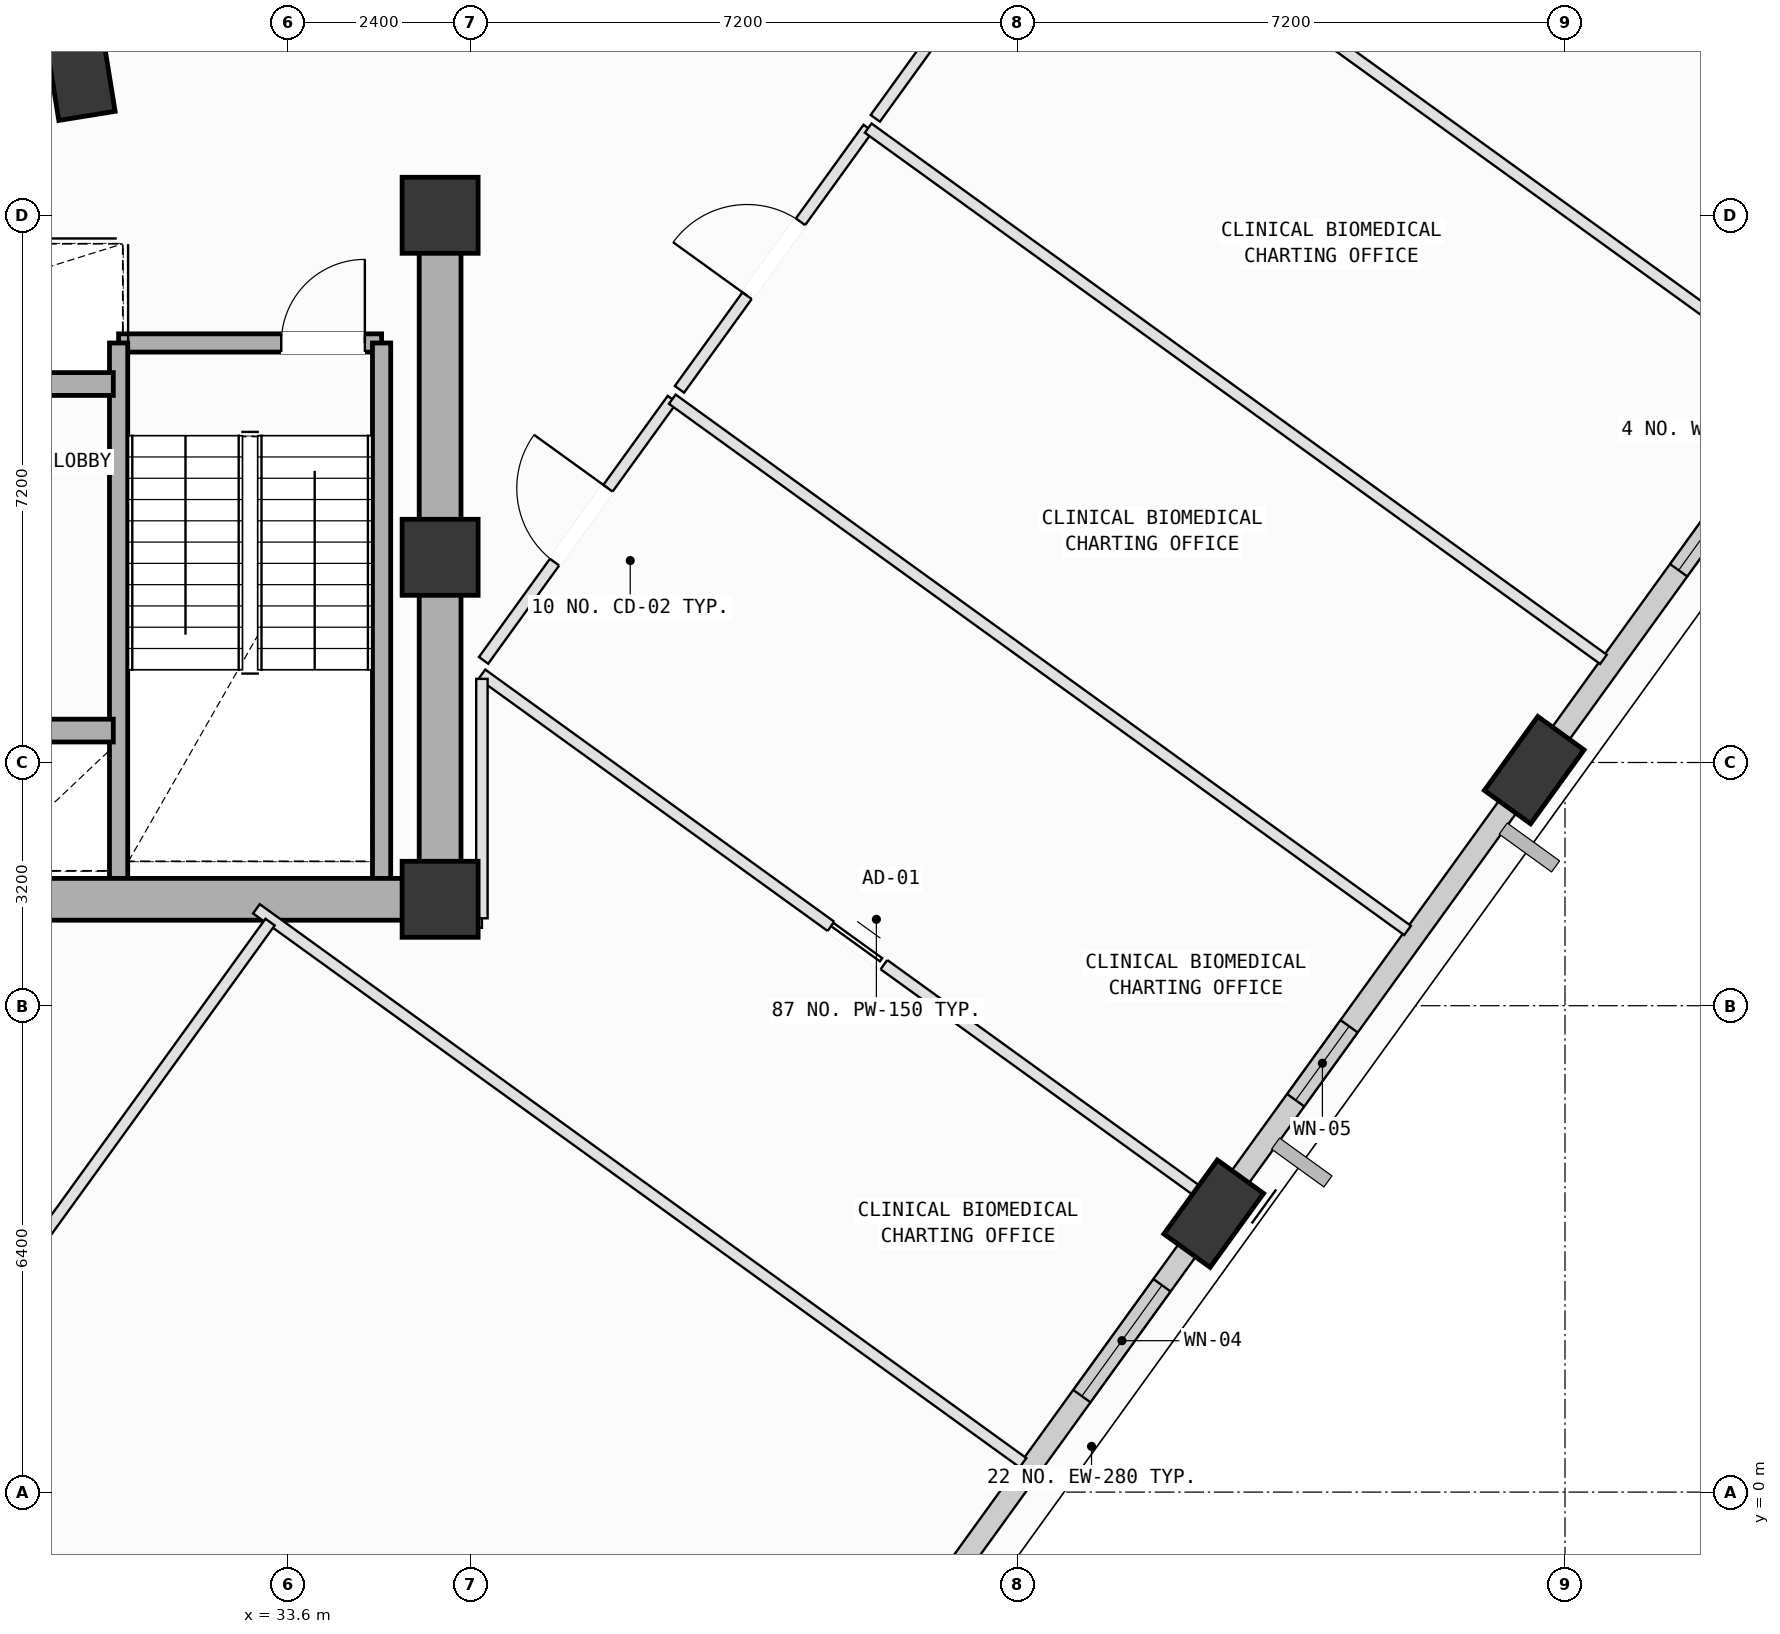
"""IFC4 building model, lengths in metres.
Left out: names, types, materials, properties, quantities, classifications, styles, units other than length and angle.
Written with IfcOpenShell. Run it as: python <this file> out.ifc"""

import sys

from ifc_helpers import new_model, si_unit, direction, frame, frame_2d, origin, origin_2d, place, context, subcontext, project, spatial, rectangle, extrude, element, fill, save


model = new_model("IFC4")
c1 = context("Model", 3, precision=1e-05, world=origin(), true_north=direction((0.0, 1.0)))
c2 = subcontext(c1, "Body", "Model", "MODEL_VIEW")
j1 = project(units=[si_unit("LENGTHUNIT", "METRE"), si_unit("PLANEANGLEUNIT", "RADIAN")], contexts=[c1])
p1 = place(None, origin())
s1 = spatial("IfcSite", under=j1, at=p1, CompositionType="ELEMENT")
p2 = place(p1, origin())
s2 = spatial("IfcBuilding", under=s1, at=p2, CompositionType="ELEMENT")
p3 = place(p2, frame((0.0, 0.0, 255.2)))
s3 = spatial("IfcBuildingStorey", under=s2, at=p3, CompositionType="ELEMENT", Elevation=255.2)
for number, where, z_axis, x_axis in (
    (1, (35.6, 7.8, 0.0), (0.0, 0.0, 1.0), (1.0, 0.0, 0.0)),
    (2, (35.6, 12.3, 0.0), (0.0, 0.0, 1.0), (1.0, 0.0, 0.0)),
    (3, (35.6, 16.8, 0.0), (0.0, 0.0, 1.0), (1.0, 0.0, 0.0)),
):
    element("IfcColumn", number, at=place(p3, frame(where, z_axis=z_axis, x_axis=x_axis)), inside=s3, PredefinedType="COLUMN", context=c2, shape_type="SweptSolid", body=[
        extrude(rectangle(XDim=1.0, YDim=1.0, at=origin_2d()), origin(), (0.0, 0.0, 1.0), 4.0),
    ])
p4 = place(p3, frame((45.778, 3.664, 0.002), z_axis=(0.086734862817, 0.050934698697, 0.994928499964), x_axis=(-0.991973488949, 0.09665186212, 0.081529226481)))
e4 = element("IfcColumn", 4, at=p4, inside=s3, PredefinedType="COLUMN", context=c2, shape_type="SweptSolid", body=[
    extrude(rectangle(XDim=1.2, YDim=0.75, at=origin_2d()), origin(), (0.0, 0.0, 1.0), 4.017),
])
p5 = place(p3, frame((49.995, 9.5, 0.002), z_axis=(0.062592857053, 0.068189108606, 0.995706974824), x_axis=(-0.977221341298, -0.198518401918, 0.075025956915)))
e5 = element("IfcColumn", 5, at=p5, inside=s3, PredefinedType="COLUMN", context=c2, shape_type="SweptSolid", body=[
    extrude(rectangle(XDim=1.2, YDim=0.75, at=origin_2d()), origin(), (0.0, 0.0, 1.0), 4.014),
])
p6 = place(p3, frame((30.858, 18.7, 0.002), z_axis=(0.025404102612, -0.011175362447, 0.999614797232), x_axis=(-0.967383589686, 0.251829726093, 0.027400355134)))
e6 = element("IfcColumn", 6, at=p6, inside=s3, PredefinedType="COLUMN", context=c2, shape_type="SweptSolid", body=[
    extrude(rectangle(XDim=1.2, YDim=0.75, at=origin_2d()), origin(), (0.0, 0.0, 1.0), 3.998),
])
p7 = place(p3, frame((45.659, 3.498, 0.0), z_axis=(0.0, 0.0, 1.0), x_axis=(-0.585684358283, -0.810539223272, 0.0)))
e7 = element("IfcWall", 7, at=p7, inside=s3, PredefinedType="SOLIDWALL", context=c2, shape_type="SweptSolid", body=[
    extrude(rectangle(XDim=6.439, YDim=0.28, at=frame_2d((3.219, 0.0))), origin(), (0.0, 0.0, 1.0), 3.265),
])
p8 = place(p7, frame((0.958, 0.0, 0.75)))
e8 = element("IfcOpeningElement", 8, at=p8, cuts=e7, PredefinedType="OPENING", context=c2, shape_type="SweptSolid", body=[
    extrude(rectangle(XDim=1.8, YDim=2.05, at=frame_2d((0.9, 1.025))), frame((0.0, 0.15, 0.0), z_axis=(0.0, -1.0, 0.0), x_axis=(1.0, 0.0, 0.0)), (0.0, 0.0, 1.0), 0.3),
])
p9 = place(p3, frame((49.871, 9.327, 0.0), z_axis=(0.0, 0.0, 1.0), x_axis=(-0.585658714941, -0.810557752177, 0.0)))
e9 = element("IfcWall", 9, at=p9, inside=s3, PredefinedType="SOLIDWALL", context=c2, shape_type="SweptSolid", body=[
    extrude(rectangle(XDim=6.414, YDim=0.28, at=frame_2d((3.207, 0.0))), origin(), (0.0, 0.0, 1.0), 3.265),
])
p10 = place(p9, frame((3.946, 0.0, 0.75)))
e10 = element("IfcOpeningElement", 10, at=p10, cuts=e9, PredefinedType="OPENING", context=c2, shape_type="SweptSolid", body=[
    extrude(rectangle(XDim=1.2, YDim=1.75, at=frame_2d((0.6, 0.875))), frame((0.0, 0.15, 0.0), z_axis=(0.0, -1.0, 0.0), x_axis=(1.0, 0.0, 0.0)), (0.0, 0.0, 1.0), 0.3),
])
p11 = place(p3, frame((54.088, 15.164, 0.0), z_axis=(0.0, 0.0, 1.0), x_axis=(-0.585656107045, -0.810559636474, 0.0)))
e11 = element("IfcWall", 11, at=p11, inside=s3, PredefinedType="SOLIDWALL", context=c2, shape_type="SweptSolid", body=[
    extrude(rectangle(XDim=6.407, YDim=0.28, at=frame_2d((3.203, 0.0))), origin(), (0.0, 0.0, 1.0), 3.265),
])
p12 = place(p11, frame((2.143, 0.0, 0.75)))
e12 = element("IfcOpeningElement", 12, at=p12, cuts=e11, PredefinedType="OPENING", context=c2, shape_type="SweptSolid", body=[
    extrude(rectangle(XDim=1.6, YDim=1.95, at=frame_2d((0.8, 0.975))), frame((0.0, 0.15, 0.0), z_axis=(0.0, -1.0, 0.0), x_axis=(1.0, 0.0, 0.0)), (0.0, 0.0, 1.0), 0.3),
])
p13 = place(p3, frame((24.94, 22.976, 0.0), z_axis=(0.0, 0.0, 1.0), x_axis=(0.81054690161, -0.585673731945, 0.0)))
e13 = element("IfcWall", 13, at=p13, inside=s3, PredefinedType="SOLIDWALL", context=c2, shape_type="SweptSolid", body=[
    extrude(rectangle(XDim=6.958, YDim=0.28, at=frame_2d((3.479, 0.0))), origin(), (0.0, 0.0, 1.0), 3.165),
])
p14 = place(p3, frame((31.37, 15.12, 0.0), z_axis=(0.0, 0.0, 1.0), x_axis=(1.0, 0.0, 0.0)))
e14 = element("IfcWall", 14, at=p14, inside=s3, PredefinedType="SOLIDWALL", context=c2, shape_type="SweptSolid", body=[
    extrude(rectangle(XDim=3.46, YDim=0.24, at=frame_2d((1.73, 0.0))), origin(), (0.0, 0.0, 1.0), 3.78),
])
p15 = place(p14, frame((2.14, 0.0, 0.0)))
e15 = element("IfcOpeningElement", 15, at=p15, cuts=e14, PredefinedType="OPENING", context=c2, shape_type="SweptSolid", body=[
    extrude(rectangle(XDim=1.1, YDim=2.15, at=frame_2d((0.55, 1.075))), frame((0.0, 0.13, 0.0), z_axis=(0.0, -1.0, 0.0), x_axis=(1.0, 0.0, 0.0)), (0.0, 0.0, 1.0), 0.26),
])
for number, where, z_axis, x_axis in (
    (16, (34.83, 15.12, 0.0), (0.0, 0.0, 1.0), (0.0, -1.0, 0.0)),
    (17, (31.37, 8.075, 0.0), (0.0, 0.0, 1.0), (0.0, 1.0, 0.0)),
):
    element("IfcWall", number, at=place(p3, frame(where, z_axis=z_axis, x_axis=x_axis)), inside=s3, PredefinedType="SOLIDWALL", context=c2, shape_type="SweptSolid", body=[
        extrude(rectangle(XDim=7.045, YDim=0.24, at=frame_2d((3.522, 0.0))), origin(), (0.0, 0.0, 1.0), 3.78),
    ])
p16 = place(p3, frame((24.8, 7.8, 0.0), z_axis=(0.0, 0.0, 1.0), x_axis=(1.0, 0.0, 0.0)))
e18 = element("IfcWall", 18, at=p16, inside=s3, PredefinedType="SHEAR", context=c2, shape_type="SweptSolid", body=[
    extrude(rectangle(XDim=10.8, YDim=0.55, at=frame_2d((5.4, 0.0))), origin(), (0.0, 0.0, 1.0), 3.78),
])
p17 = place(p3, frame((35.6, 7.8, 0.0), z_axis=(0.0, 0.0, 1.0), x_axis=(0.0, 1.0, 0.0)))
e19 = element("IfcWall", 19, at=p17, inside=s3, PredefinedType="SHEAR", context=c2, shape_type="SweptSolid", body=[
    extrude(rectangle(XDim=9.0, YDim=0.55, at=frame_2d((4.5, 0.0))), origin(), (0.0, 0.0, 1.0), 3.78),
])
p18 = place(p3, frame((29.6, 10.02, 0.0), z_axis=(0.0, 0.0, 1.0), x_axis=(1.0, 0.0, 0.0)))
e20 = element("IfcWall", 20, at=p18, inside=s3, PredefinedType="SOLIDWALL", context=c2, shape_type="SweptSolid", body=[
    extrude(rectangle(XDim=1.7, YDim=0.3, at=frame_2d((0.85, 0.0))), origin(), (0.0, 0.0, 1.0), 3.78),
])
p19 = place(p3, frame((25.85, 14.58, 0.0), z_axis=(0.0, 0.0, 1.0), x_axis=(1.0, 0.0, 0.0)))
e21 = element("IfcWall", 21, at=p19, inside=s3, PredefinedType="SOLIDWALL", context=c2, shape_type="SweptSolid", body=[
    extrude(rectangle(XDim=5.45, YDim=0.3, at=frame_2d((2.725, 0.0))), origin(), (0.0, 0.0, 1.0), 3.78),
])
p20 = place(p19, frame((0.34, 0.0, 0.0)))
e22 = element("IfcOpeningElement", 22, at=p20, cuts=e21, PredefinedType="OPENING", context=c2, shape_type="SweptSolid", body=[
    extrude(rectangle(XDim=1.12, YDim=2.15, at=frame_2d((0.56, 1.075))), frame((0.0, 0.16, 0.0), z_axis=(0.0, -1.0, 0.0), x_axis=(1.0, 0.0, 0.0)), (0.0, 0.0, 1.0), 0.32),
])
p21 = place(p19, frame((2.24, 0.0, 0.0)))
e23 = element("IfcOpeningElement", 23, at=p21, cuts=e21, PredefinedType="OPENING", context=c2, shape_type="SweptSolid", body=[
    extrude(rectangle(XDim=1.12, YDim=2.15, at=frame_2d((0.56, 1.075))), frame((0.0, 0.16, 0.0), z_axis=(0.0, -1.0, 0.0), x_axis=(1.0, 0.0, 0.0)), (0.0, 0.0, 1.0), 0.32),
])
p22 = place(p3, frame((36.15, 10.762, 0.0), z_axis=(0.0, 0.0, 1.0), x_axis=(0.810568850791, -0.585643354037, 0.0)))
e24 = element("IfcWall", 24, at=p22, inside=s3, PredefinedType="PARTITIONING", context=c2, shape_type="SweptSolid", body=[
    extrude(rectangle(XDim=12.192, YDim=0.15, at=frame_2d((6.096, 0.0))), origin(), (0.0, 0.0, 1.0), 3.165),
])
p23 = place(p22, frame((5.666, 0.0, 0.0)))
e25 = element("IfcOpeningElement", 25, at=p23, cuts=e24, PredefinedType="OPENING", context=c2, shape_type="SweptSolid", body=[
    extrude(rectangle(XDim=0.86, YDim=2.06, at=frame_2d((0.43, 1.03))), frame((0.0, 0.085, 0.0), z_axis=(0.0, -1.0, 0.0), x_axis=(1.0, 0.0, 0.0)), (0.0, 0.0, 1.0), 0.17),
])
p24 = place(p3, frame((43.269, 0.387, 0.0), z_axis=(0.0, 0.0, 1.0), x_axis=(-0.810534343192, 0.585691111855, 0.0)))
e26 = element("IfcWall", 26, at=p24, inside=s3, PredefinedType="PARTITIONING", context=c2, shape_type="SweptSolid", body=[
    extrude(rectangle(XDim=12.444, YDim=0.15, at=frame_2d((6.222, 0.0))), origin(), (0.0, 0.0, 1.0), 3.78),
])
p25 = place(p3, frame((35.6, 7.5, 0.0), z_axis=(0.0, 0.0, 1.0), x_axis=(1.0, 0.0, 0.0)))
e27 = element("IfcWall", 27, at=p25, inside=s3, PredefinedType="PARTITIONING", context=c2, shape_type="SweptSolid", body=[
    extrude(rectangle(XDim=0.55, YDim=0.15, at=frame_2d((0.275, 0.0))), origin(), (0.0, 0.0, 1.0), 3.165),
])
p26 = place(p3, frame((36.15, 7.55, 0.0), z_axis=(0.0, 0.0, 1.0), x_axis=(0.0, 1.0, 0.0)))
e28 = element("IfcWall", 28, at=p26, inside=s3, PredefinedType="PARTITIONING", context=c2, shape_type="SweptSolid", body=[
    extrude(rectangle(XDim=3.15, YDim=0.15, at=frame_2d((1.575, 0.0))), origin(), (0.0, 0.0, 1.0), 3.78),
])
p27 = place(p3, frame((36.172, 10.944, 0.0), z_axis=(0.0, 0.0, 1.0), x_axis=(0.585723940183, 0.810510620471, 0.0)))
e29 = element("IfcWall", 29, at=p27, inside=s3, PredefinedType="PARTITIONING", context=c2, shape_type="SweptSolid", body=[
    extrude(rectangle(XDim=4.239, YDim=0.15, at=frame_2d((2.12, 0.0))), origin(), (0.0, 0.0, 1.0), 3.78),
])
p28 = place(p27, frame((1.594, 0.0, 0.0)))
e30 = element("IfcOpeningElement", 30, at=p28, cuts=e29, PredefinedType="OPENING", context=c2, shape_type="SweptSolid", body=[
    extrude(rectangle(XDim=1.2, YDim=2.15, at=frame_2d((0.6, 1.075))), frame((0.0, 0.085, 0.0), z_axis=(0.0, -1.0, 0.0), x_axis=(1.0, 0.0, 0.0)), (0.0, 0.0, 1.0), 0.17),
])
p29 = place(p3, frame((38.655, 14.38, 0.0), z_axis=(0.0, 0.0, 1.0), x_axis=(0.810553530126, -0.585664558259, 0.0)))
e31 = element("IfcWall", 31, at=p29, inside=s3, PredefinedType="PARTITIONING", context=c2, shape_type="SweptSolid", body=[
    extrude(rectangle(XDim=11.935, YDim=0.15, at=frame_2d((5.968, 0.0))), origin(), (0.0, 0.0, 1.0), 3.78),
])
p30 = place(p3, frame((38.749, 14.51, 0.0), z_axis=(0.0, 0.0, 1.0), x_axis=(0.585587255826, 0.810609379303, 0.0)))
e32 = element("IfcWall", 32, at=p30, inside=s3, PredefinedType="PARTITIONING", context=c2, shape_type="SweptSolid", body=[
    extrude(rectangle(XDim=4.24, YDim=0.15, at=frame_2d((2.12, 0.0))), origin(), (0.0, 0.0, 1.0), 3.78),
])
p31 = place(p30, frame((1.52, 0.0, 0.0)))
e33 = element("IfcOpeningElement", 33, at=p31, cuts=e32, PredefinedType="OPENING", context=c2, shape_type="SweptSolid", body=[
    extrude(rectangle(XDim=1.2, YDim=2.15, at=frame_2d((0.6, 1.075))), frame((0.0, 0.085, 0.0), z_axis=(0.0, -1.0, 0.0), x_axis=(1.0, 0.0, 0.0)), (0.0, 0.0, 1.0), 0.17),
])
p32 = place(p3, frame((41.232, 17.947, 0.0), z_axis=(0.0, 0.0, 1.0), x_axis=(0.810553530126, -0.585664558259, 0.0)))
e34 = element("IfcWall", 34, at=p32, inside=s3, PredefinedType="PARTITIONING", context=c2, shape_type="SweptSolid", body=[
    extrude(rectangle(XDim=11.935, YDim=0.15, at=frame_2d((5.968, 0.0))), origin(), (0.0, 0.0, 1.0), 3.78),
])
p33 = place(p3, frame((50.522, 9.836, 0.0), z_axis=(0.0, 0.0, 1.0), x_axis=(-0.585445670431, -0.810711642308, 0.0)))
e35 = element("IfcWall", 35, at=p33, inside=s3, PredefinedType="PARTITIONING", context=c2, shape_type="SweptSolid", body=[
    extrude(rectangle(XDim=0.794, YDim=0.15, at=frame_2d((0.397, 0.0))), origin(), (0.0, 0.0, 1.0), 3.265),
])
p34 = place(p3, frame((41.326, 18.076, 0.0), z_axis=(0.0, 0.0, 1.0), x_axis=(0.585667160303, 0.810551650016, 0.0)))
e36 = element("IfcWall", 36, at=p34, inside=s3, PredefinedType="PARTITIONING", context=c2, shape_type="SweptSolid", body=[
    extrude(rectangle(XDim=4.34, YDim=0.15, at=frame_2d((2.17, 0.0))), origin(), (0.0, 0.0, 1.0), 3.78),
])
p35 = place(p34, frame((1.57, 0.0, 0.0)))
e37 = element("IfcOpeningElement", 37, at=p35, cuts=e36, PredefinedType="OPENING", context=c2, shape_type="SweptSolid", body=[
    extrude(rectangle(XDim=1.2, YDim=2.15, at=frame_2d((0.6, 1.075))), frame((0.0, 0.085, 0.0), z_axis=(0.0, -1.0, 0.0), x_axis=(1.0, 0.0, 0.0)), (0.0, 0.0, 1.0), 0.17),
])
p36 = place(p3, frame((43.868, 21.594, 0.0), z_axis=(0.0, 0.0, 1.0), x_axis=(0.810525461994, -0.585703402295, 0.0)))
e38 = element("IfcWall", 38, at=p36, inside=s3, PredefinedType="PARTITIONING", context=c2, shape_type="SweptSolid", body=[
    extrude(rectangle(XDim=11.934, YDim=0.15, at=frame_2d((5.967, 0.0))), origin(), (0.0, 0.0, 1.0), 3.78),
])
p37 = place(p3, frame((46.503, 25.242, 0.0), z_axis=(0.0, 0.0, 1.0), x_axis=(0.810553530126, -0.585664558259, 0.0)))
e39 = element("IfcWall", 39, at=p37, inside=s3, PredefinedType="PARTITIONING", context=c2, shape_type="SweptSolid", body=[
    extrude(rectangle(XDim=11.935, YDim=0.15, at=frame_2d((5.968, 0.0))), origin(), (0.0, 0.0, 1.0), 3.78),
])
p38 = place(p3, frame((33.363, 7.5, 0.0), z_axis=(0.0, 0.0, 1.0), x_axis=(-0.585650908252, -0.810563392748, 0.0)))
e40 = element("IfcWall", 40, at=p38, inside=s3, PredefinedType="PARTITIONING", context=c2, shape_type="SweptSolid", body=[
    extrude(rectangle(XDim=13.174, YDim=0.15, at=frame_2d((6.587, 0.0))), origin(), (0.0, 0.0, 1.0), 3.78),
])
p39 = place(p8, origin())
e41 = element("IfcWindow", 41, at=p39, inside=s3, PartitioningType="SINGLE_PANEL", PredefinedType="WINDOW", context=c2, shape_type="SweptSolid", body=[
    extrude(rectangle(XDim=1.8, YDim=2.05, at=frame_2d((0.9, 1.025))), frame((0.0, 0.03, 0.0), z_axis=(0.0, -1.0, 0.0), x_axis=(1.0, 0.0, 0.0)), (0.0, 0.0, 1.0), 0.06),
])
fill(e8, e41)
p40 = place(p10, origin())
e42 = element("IfcWindow", 42, at=p40, inside=s3, PartitioningType="SINGLE_PANEL", PredefinedType="WINDOW", context=c2, shape_type="SweptSolid", body=[
    extrude(rectangle(XDim=1.2, YDim=1.75, at=frame_2d((0.6, 0.875))), frame((0.0, 0.03, 0.0), z_axis=(0.0, -1.0, 0.0), x_axis=(1.0, 0.0, 0.0)), (0.0, 0.0, 1.0), 0.06),
])
fill(e10, e42)
p41 = place(p12, origin())
e43 = element("IfcWindow", 43, at=p41, inside=s3, PartitioningType="SINGLE_PANEL", PredefinedType="WINDOW", context=c2, shape_type="SweptSolid", body=[
    extrude(rectangle(XDim=1.6, YDim=1.95, at=frame_2d((0.8, 0.975))), frame((0.0, 0.03, 0.0), z_axis=(0.0, -1.0, 0.0), x_axis=(1.0, 0.0, 0.0)), (0.0, 0.0, 1.0), 0.06),
])
fill(e12, e43)
p42 = place(p15, origin())
e44 = element("IfcDoor", 44, at=p42, inside=s3, OperationType="SINGLE_SWING_RIGHT", PredefinedType="DOOR", context=c2, shape_type="SweptSolid", body=[
    extrude(rectangle(XDim=1.1, YDim=2.15, at=frame_2d((0.55, 1.075))), frame((0.0, 0.025, 0.0), z_axis=(0.0, -1.0, 0.0), x_axis=(1.0, 0.0, 0.0)), (0.0, 0.0, 1.0), 0.05),
])
fill(e15, e44)
p43 = place(p28, origin())
e45 = element("IfcDoor", 45, at=p43, inside=s3, OperationType="SINGLE_SWING_RIGHT", PredefinedType="DOOR", context=c2, shape_type="SweptSolid", body=[
    extrude(rectangle(XDim=1.2, YDim=2.15, at=frame_2d((0.6, 1.075))), frame((0.0, 0.025, 0.0), z_axis=(0.0, -1.0, 0.0), x_axis=(1.0, 0.0, 0.0)), (0.0, 0.0, 1.0), 0.05),
])
fill(e30, e45)
p44 = place(p31, origin())
e46 = element("IfcDoor", 46, at=p44, inside=s3, OperationType="SINGLE_SWING_LEFT", PredefinedType="DOOR", context=c2, shape_type="SweptSolid", body=[
    extrude(rectangle(XDim=1.2, YDim=2.15, at=frame_2d((0.6, 1.075))), frame((0.0, 0.025, 0.0), z_axis=(0.0, -1.0, 0.0), x_axis=(1.0, 0.0, 0.0)), (0.0, 0.0, 1.0), 0.05),
])
fill(e33, e46)
p45 = place(p23, origin())
e47 = element("IfcDoor", 47, at=p45, inside=s3, OperationType="SLIDING_TO_LEFT", PredefinedType="DOOR", context=c2, shape_type="SweptSolid", body=[
    extrude(rectangle(XDim=0.86, YDim=2.06, at=frame_2d((0.43, 1.03))), frame((0.0, 0.025, 0.0), z_axis=(0.0, -1.0, 0.0), x_axis=(1.0, 0.0, 0.0)), (0.0, 0.0, 1.0), 0.05),
])
fill(e25, e47)
save(model, sys.argv[1])
